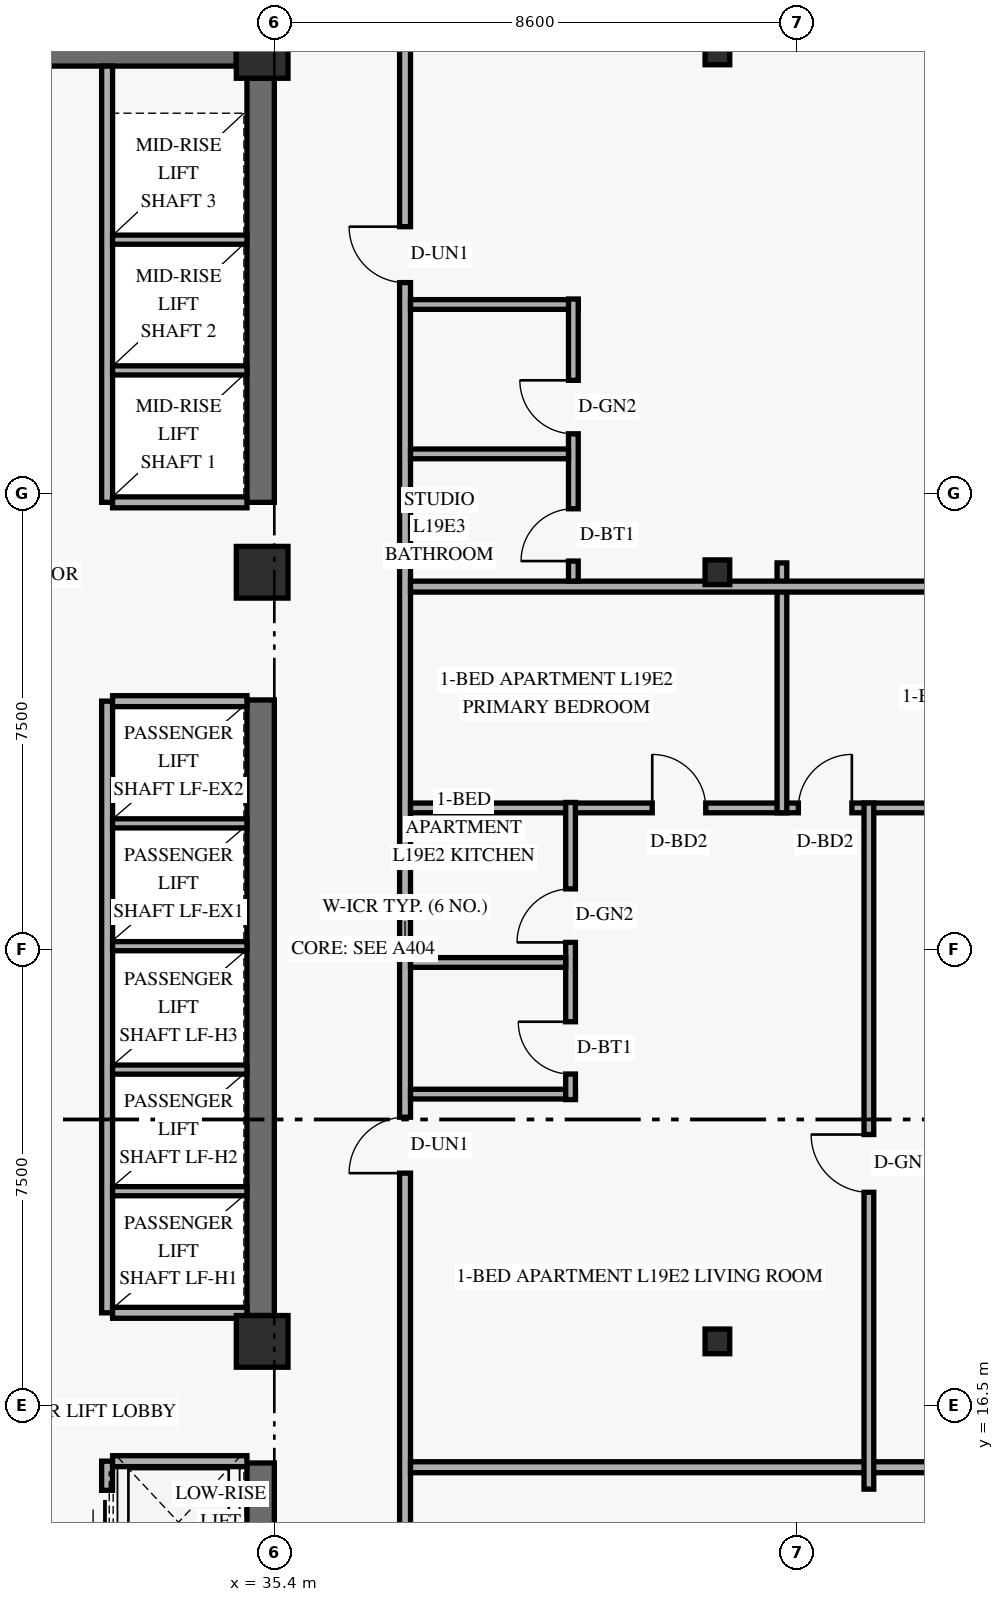
"""IFC4 building model, lengths in metres.
Left out: names, types, materials, properties, quantities, classifications, styles, units other than length and angle.
Written with IfcOpenShell. Run it as: python <this file> out.ifc"""

import sys

from ifc_helpers import new_model, si_unit, direction, frame, frame_2d, origin, origin_2d, place, context, subcontext, project, spatial, rectangle, hollow_rectangle, extrude, element, fill, save


model = new_model("IFC4")
c1 = context("Model", 3, precision=1e-05, world=origin(), true_north=direction((0.0, 1.0)))
c2 = subcontext(c1, "Body", "Model", "MODEL_VIEW")
j1 = project(units=[si_unit("LENGTHUNIT", "METRE"), si_unit("PLANEANGLEUNIT", "RADIAN")], contexts=[c1])
p1 = place(None, origin())
s1 = spatial("IfcSite", under=j1, at=p1, CompositionType="ELEMENT")
p2 = place(p1, origin())
s2 = spatial("IfcBuilding", under=s1, at=p2, CompositionType="ELEMENT")
p3 = place(p2, frame((0.0, 0.0, 76.8)))
s3 = spatial("IfcBuildingStorey", under=s2, at=p3, CompositionType="ELEMENT", Elevation=76.8)
p4 = place(p3, frame((35.175, 9.675, 0.0), z_axis=(0.0, 0.0, 1.0), x_axis=(0.0, 1.0, 0.0)))
e1 = element("IfcWall", 1, at=p4, inside=s3, PredefinedType="SHEAR", context=c2, shape_type="SweptSolid", body=[
    extrude(rectangle(XDim=5.875, YDim=0.45, at=frame_2d((2.938, 0.0))), origin(), (0.0, 0.0, 1.0), 2.749),
])
p5 = place(p3, frame((35.175, 17.975, 0.0), z_axis=(0.0, 0.0, 1.0), x_axis=(0.0, 1.0, 0.0)))
e2 = element("IfcWall", 2, at=p5, inside=s3, PredefinedType="SHEAR", context=c2, shape_type="SweptSolid", body=[
    extrude(rectangle(XDim=10.125, YDim=0.45, at=frame_2d((5.062, 0.0))), origin(), (0.0, 0.0, 1.0), 2.749),
])
p6 = place(p3, frame((35.175, 31.35, 0.0), z_axis=(0.0, 0.0, 1.0), x_axis=(0.0, 1.0, 0.0)))
e3 = element("IfcWall", 3, at=p6, inside=s3, PredefinedType="SHEAR", context=c2, shape_type="SweptSolid", body=[
    extrude(rectangle(XDim=6.975, YDim=0.45, at=frame_2d((3.487, 0.0))), origin(), (0.0, 0.0, 1.0), 2.749),
])
p7 = place(p3, frame((24.625, 38.75, 0.0), z_axis=(0.0, 0.0, 1.0), x_axis=(1.0, 0.0, 0.0)))
e4 = element("IfcWall", 4, at=p7, inside=s3, PredefinedType="SHEAR", context=c2, shape_type="SweptSolid", body=[
    extrude(rectangle(XDim=10.15, YDim=0.45, at=frame_2d((5.075, 0.0))), origin(), (0.0, 0.0, 1.0), 3.36),
])
for number, where, z_axis, x_axis in (
    (5, (35.2, 17.55, 0.0), (0.0, 0.0, 1.0), (1.0, 0.0, 0.0)),
    (6, (35.2, 30.2, 0.0), (0.0, 0.0, 1.0), (1.0, 0.0, 0.0)),
    (7, (35.2, 38.75, 0.0), (0.0, 0.0, 1.0), (1.0, 0.0, 0.0)),
):
    element("IfcColumn", number, at=place(p3, frame(where, z_axis=z_axis, x_axis=x_axis)), inside=s3, PredefinedType="COLUMN", context=c2, shape_type="SweptSolid", body=[
        extrude(rectangle(XDim=0.85, YDim=0.85, at=origin_2d()), origin(), (0.0, 0.0, 1.0), 3.6),
    ])
for number, where, z_axis, x_axis in (
    (8, (42.624, 17.55, 0.0), (0.035, 0.0, 0.999), (0.0, 1.0, 0.0)),
    (9, (42.624, 30.2, 0.0), (0.035, 0.0, 0.999), (0.0, 1.0, 0.0)),
    (10, (42.624, 38.75, 0.0), (0.035, 0.0, 0.999), (0.0, 1.0, 0.0)),
):
    element("IfcColumn", number, at=place(p3, frame(where, z_axis=z_axis, x_axis=x_axis)), inside=s3, PredefinedType="COLUMN", context=c2, shape_type="SweptSolid", body=[
        extrude(hollow_rectangle(XDim=0.406, YDim=0.406, WallThickness=0.016, at=origin_2d()), origin(), (0.0, 0.0, 1.0), 3.602),
    ])
p8 = place(p3, frame((32.65, 9.5, 0.0), z_axis=(0.0, 0.0, 1.0), x_axis=(0.0, 1.0, 0.0)))
e11 = element("IfcWall", 11, at=p8, inside=s3, PredefinedType="STANDARD", context=c2, shape_type="SweptSolid", body=[
    extrude(rectangle(XDim=6.08, YDim=0.18, at=frame_2d((3.04, 0.0))), origin(), (0.0, 0.0, 1.0), 3.36),
])
p9 = place(p8, frame((0.55, 0.0, 0.0)))
e12 = element("IfcOpeningElement", 12, at=p9, cuts=e11, PredefinedType="OPENING", context=c2, shape_type="SweptSolid", body=[
    extrude(rectangle(XDim=1.05, YDim=2.2, at=frame_2d((0.525, 1.1))), frame((0.0, 0.1, 0.0), z_axis=(0.0, -1.0, 0.0), x_axis=(1.0, 0.0, 0.0)), (0.0, 0.0, 1.0), 0.2),
])
p10 = place(p8, frame((2.55, 0.0, 0.0)))
e13 = element("IfcOpeningElement", 13, at=p10, cuts=e11, PredefinedType="OPENING", context=c2, shape_type="SweptSolid", body=[
    extrude(rectangle(XDim=1.05, YDim=2.2, at=frame_2d((0.525, 1.1))), frame((0.0, 0.1, 0.0), z_axis=(0.0, -1.0, 0.0), x_axis=(1.0, 0.0, 0.0)), (0.0, 0.0, 1.0), 0.2),
])
p11 = place(p8, frame((4.55, 0.0, 0.0)))
e14 = element("IfcOpeningElement", 14, at=p11, cuts=e11, PredefinedType="OPENING", context=c2, shape_type="SweptSolid", body=[
    extrude(rectangle(XDim=1.05, YDim=2.2, at=frame_2d((0.525, 1.1))), frame((0.0, 0.1, 0.0), z_axis=(0.0, -1.0, 0.0), x_axis=(1.0, 0.0, 0.0)), (0.0, 0.0, 1.0), 0.2),
])
p12 = place(p3, frame((32.74, 15.58, 0.0), z_axis=(0.0, 0.0, 1.0), x_axis=(1.0, 0.0, 0.0)))
e15 = element("IfcWall", 15, at=p12, inside=s3, PredefinedType="STANDARD", context=c2, shape_type="SweptSolid", body=[
    extrude(rectangle(XDim=2.21, YDim=0.18, at=frame_2d((1.105, 0.0))), origin(), (0.0, 0.0, 1.0), 3.36),
])
p13 = place(p3, frame((32.65, 18.02, 0.0), z_axis=(0.0, 0.0, 1.0), x_axis=(0.0, 1.0, 0.0)))
e16 = element("IfcWall", 16, at=p13, inside=s3, PredefinedType="STANDARD", context=c2, shape_type="SweptSolid", body=[
    extrude(rectangle(XDim=10.06, YDim=0.18, at=frame_2d((5.03, 0.0))), origin(), (0.0, 0.0, 1.0), 3.36),
])
for number, where, z_axis, x_axis in (
    (17, (32.74, 18.02, 0.0), (0.0, 0.0, 1.0), (1.0, 0.0, 0.0)),
    (18, (32.74, 28.08, 0.0), (0.0, 0.0, 1.0), (1.0, 0.0, 0.0)),
):
    element("IfcWall", number, at=place(p3, frame(where, z_axis=z_axis, x_axis=x_axis)), inside=s3, PredefinedType="STANDARD", context=c2, shape_type="SweptSolid", body=[
        extrude(rectangle(XDim=2.21, YDim=0.18, at=frame_2d((1.105, 0.0))), origin(), (0.0, 0.0, 1.0), 3.36),
    ])
for number, where, z_axis, x_axis in (
    (19, (32.74, 20.02, 0.0), (0.0, 0.0, 1.0), (1.0, 0.0, 0.0)),
    (20, (32.74, 22.02, 0.0), (0.0, 0.0, 1.0), (1.0, 0.0, 0.0)),
    (21, (32.74, 24.05, 0.0), (0.0, 0.0, 1.0), (1.0, 0.0, 0.0)),
    (22, (32.74, 26.07, 0.0), (0.0, 0.0, 1.0), (1.0, 0.0, 0.0)),
):
    element("IfcWall", number, at=place(p3, frame(where, z_axis=z_axis, x_axis=x_axis)), inside=s3, PredefinedType="STANDARD", context=c2, shape_type="SweptSolid", body=[
        extrude(rectangle(XDim=2.21, YDim=0.15, at=frame_2d((1.105, 0.0))), origin(), (0.0, 0.0, 1.0), 3.36),
    ])
p14 = place(p3, frame((32.65, 31.35, 0.0), z_axis=(0.0, 0.0, 1.0), x_axis=(0.0, 1.0, 0.0)))
e23 = element("IfcWall", 23, at=p14, inside=s3, PredefinedType="STANDARD", context=c2, shape_type="SweptSolid", body=[
    extrude(rectangle(XDim=7.175, YDim=0.18, at=frame_2d((3.587, 0.0))), origin(), (0.0, 0.0, 1.0), 3.36),
])
p15 = place(p3, frame((32.74, 31.35, 0.0), z_axis=(0.0, 0.0, 1.0), x_axis=(1.0, 0.0, 0.0)))
e24 = element("IfcWall", 24, at=p15, inside=s3, PredefinedType="STANDARD", context=c2, shape_type="SweptSolid", body=[
    extrude(rectangle(XDim=2.21, YDim=0.18, at=frame_2d((1.105, 0.0))), origin(), (0.0, 0.0, 1.0), 3.36),
])
for number, where, z_axis, x_axis in (
    (25, (32.74, 33.52, 0.0), (0.0, 0.0, 1.0), (1.0, 0.0, 0.0)),
    (26, (32.74, 35.67, 0.0), (0.0, 0.0, 1.0), (1.0, 0.0, 0.0)),
):
    element("IfcWall", number, at=place(p3, frame(where, z_axis=z_axis, x_axis=x_axis)), inside=s3, PredefinedType="STANDARD", context=c2, shape_type="SweptSolid", body=[
        extrude(rectangle(XDim=2.21, YDim=0.15, at=frame_2d((1.105, 0.0))), origin(), (0.0, 0.0, 1.0), 3.36),
    ])
p16 = place(p3, frame((37.55, 2.98, 0.0), z_axis=(0.0, 0.0, 1.0), x_axis=(0.0, 1.0, 0.0)))
e27 = element("IfcWall", 27, at=p16, inside=s3, PredefinedType="STANDARD", context=c2, shape_type="SweptSolid", body=[
    extrude(rectangle(XDim=42.04, YDim=0.18, at=frame_2d((21.02, 0.0))), origin(), (0.0, 0.0, 1.0), 2.731),
])
p17 = place(p16, frame((8.898, 0.0, 0.0)))
e28 = element("IfcOpeningElement", 28, at=p17, cuts=e27, PredefinedType="OPENING", context=c2, shape_type="SweptSolid", body=[
    extrude(rectangle(XDim=0.92, YDim=2.15, at=frame_2d((0.46, 1.075))), frame((0.0, 0.1, 0.0), z_axis=(0.0, -1.0, 0.0), x_axis=(1.0, 0.0, 0.0)), (0.0, 0.0, 1.0), 0.2),
])
p18 = place(p16, frame((17.337, 0.0, 0.0)))
e29 = element("IfcOpeningElement", 29, at=p18, cuts=e27, PredefinedType="OPENING", context=c2, shape_type="SweptSolid", body=[
    extrude(rectangle(XDim=0.92, YDim=2.15, at=frame_2d((0.46, 1.075))), frame((0.0, 0.1, 0.0), z_axis=(0.0, -1.0, 0.0), x_axis=(1.0, 0.0, 0.0)), (0.0, 0.0, 1.0), 0.2),
])
p19 = place(p16, frame((31.984, 0.0, 0.0)))
e30 = element("IfcOpeningElement", 30, at=p19, cuts=e27, PredefinedType="OPENING", context=c2, shape_type="SweptSolid", body=[
    extrude(rectangle(XDim=0.92, YDim=2.15, at=frame_2d((0.46, 1.075))), frame((0.0, 0.1, 0.0), z_axis=(0.0, -1.0, 0.0), x_axis=(1.0, 0.0, 0.0)), (0.0, 0.0, 1.0), 0.2),
])
p20 = place(p3, frame((35.42, 38.75, 0.0), z_axis=(0.0, 0.0, 1.0), x_axis=(0.0, 1.0, 0.0)))
e31 = element("IfcWall", 31, at=p20, inside=s3, PredefinedType="STANDARD", context=c2, shape_type="SweptSolid", body=[
    extrude(rectangle(XDim=0.51, YDim=0.18, at=frame_2d((0.255, 0.0))), origin(), (0.0, 0.0, 1.0), 2.731),
])
p21 = place(p3, frame((37.64, 15.48, 0.0), z_axis=(0.0, 0.0, 1.0), x_axis=(1.0, 0.0, 0.0)))
e32 = element("IfcWall", 32, at=p21, inside=s3, PredefinedType="PARTITIONING", context=c2, shape_type="SweptSolid", body=[
    extrude(rectangle(XDim=15.68, YDim=0.18, at=frame_2d((7.84, 0.0))), origin(), (0.0, 0.0, 1.0), 2.731),
])
p22 = place(p3, frame((37.64, 26.324, 0.0), z_axis=(0.0, 0.0, 1.0), x_axis=(1.0, 0.0, 0.0)))
e33 = element("IfcWall", 33, at=p22, inside=s3, PredefinedType="PARTITIONING", context=c2, shape_type="SweptSolid", body=[
    extrude(rectangle(XDim=15.68, YDim=0.16, at=frame_2d((7.84, 0.0))), origin(), (0.0, 0.0, 1.0), 2.731),
])
p23 = place(p22, frame((3.975, 0.0, 0.0)))
e34 = element("IfcOpeningElement", 34, at=p23, cuts=e33, PredefinedType="OPENING", context=c2, shape_type="SweptSolid", body=[
    extrude(rectangle(XDim=0.88, YDim=2.14, at=frame_2d((0.44, 1.07))), frame((0.0, 0.09, 0.0), z_axis=(0.0, -1.0, 0.0), x_axis=(1.0, 0.0, 0.0)), (0.0, 0.0, 1.0), 0.18),
])
p24 = place(p22, frame((6.378, 0.0, 0.0)))
e35 = element("IfcOpeningElement", 35, at=p24, cuts=e33, PredefinedType="OPENING", context=c2, shape_type="SweptSolid", body=[
    extrude(rectangle(XDim=0.88, YDim=2.14, at=frame_2d((0.44, 1.07))), frame((0.0, 0.09, 0.0), z_axis=(0.0, -1.0, 0.0), x_axis=(1.0, 0.0, 0.0)), (0.0, 0.0, 1.0), 0.18),
])
p25 = place(p3, frame((37.64, 21.617, 0.0), z_axis=(0.0, 0.0, 1.0), x_axis=(1.0, 0.0, 0.0)))
e36 = element("IfcWall", 36, at=p25, inside=s3, PredefinedType="PLUMBINGWALL", context=c2, shape_type="SweptSolid", body=[
    extrude(rectangle(XDim=2.712, YDim=0.16, at=frame_2d((1.356, 0.0))), origin(), (0.0, 0.0, 1.0), 3.36),
])
p26 = place(p3, frame((40.272, 21.527, 0.0), z_axis=(0.0, 0.0, 1.0), x_axis=(0.0, 1.0, 0.0)))
e37 = element("IfcWall", 37, at=p26, inside=s3, PredefinedType="PLUMBINGWALL", context=c2, shape_type="SweptSolid", body=[
    extrude(rectangle(XDim=4.887, YDim=0.16, at=frame_2d((2.443, 0.0))), origin(), (0.0, 0.0, 1.0), 3.36),
])
p27 = place(p26, frame((0.42, 0.0, 0.0)))
e38 = element("IfcOpeningElement", 38, at=p27, cuts=e37, PredefinedType="OPENING", context=c2, shape_type="SweptSolid", body=[
    extrude(rectangle(XDim=0.86, YDim=2.12, at=frame_2d((0.43, 1.06))), frame((0.0, 0.09, 0.0), z_axis=(0.0, -1.0, 0.0), x_axis=(1.0, 0.0, 0.0)), (0.0, 0.0, 1.0), 0.18),
])
p28 = place(p26, frame((2.585, 0.0, 0.0)))
e39 = element("IfcOpeningElement", 39, at=p28, cuts=e37, PredefinedType="OPENING", context=c2, shape_type="SweptSolid", body=[
    extrude(rectangle(XDim=0.88, YDim=2.12, at=frame_2d((0.44, 1.06))), frame((0.0, 0.09, 0.0), z_axis=(0.0, -1.0, 0.0), x_axis=(1.0, 0.0, 0.0)), (0.0, 0.0, 1.0), 0.18),
])
p29 = place(p3, frame((37.64, 23.782, 0.0), z_axis=(0.0, 0.0, 1.0), x_axis=(1.0, 0.0, 0.0)))
e40 = element("IfcWall", 40, at=p29, inside=s3, PredefinedType="PLUMBINGWALL", context=c2, shape_type="SweptSolid", body=[
    extrude(rectangle(XDim=2.552, YDim=0.16, at=frame_2d((1.276, 0.0))), origin(), (0.0, 0.0, 1.0), 3.36),
])
p30 = place(p3, frame((45.178, 15.12, 0.0), z_axis=(0.0, 0.0, 1.0), x_axis=(0.0, 1.0, 0.0)))
e41 = element("IfcWall", 41, at=p30, inside=s3, PredefinedType="PARTITIONING", context=c2, shape_type="SweptSolid", body=[
    extrude(rectangle(XDim=11.284, YDim=0.16, at=frame_2d((5.642, 0.0))), origin(), (0.0, 0.0, 1.0), 2.731),
])
p31 = place(p30, frame((4.882, 0.0, 0.0)))
e42 = element("IfcOpeningElement", 42, at=p31, cuts=e41, PredefinedType="OPENING", context=c2, shape_type="SweptSolid", body=[
    extrude(rectangle(XDim=0.95, YDim=2.15, at=frame_2d((0.475, 1.075))), frame((0.0, 0.09, 0.0), z_axis=(0.0, -1.0, 0.0), x_axis=(1.0, 0.0, 0.0)), (0.0, 0.0, 1.0), 0.18),
])
p32 = place(p3, frame((43.748, 26.244, 0.0), z_axis=(0.0, 0.0, 1.0), x_axis=(0.0, 1.0, 0.0)))
e43 = element("IfcWall", 43, at=p32, inside=s3, PredefinedType="PARTITIONING", context=c2, shape_type="SweptSolid", body=[
    extrude(rectangle(XDim=4.11, YDim=0.16, at=frame_2d((2.055, 0.0))), origin(), (0.0, 0.0, 1.0), 2.731),
])
p33 = place(p3, frame((37.64, 29.964, 0.0), z_axis=(0.0, 0.0, 1.0), x_axis=(1.0, 0.0, 0.0)))
e44 = element("IfcWall", 44, at=p33, inside=s3, PredefinedType="PARTITIONING", context=c2, shape_type="SweptSolid", body=[
    extrude(rectangle(XDim=15.68, YDim=0.18, at=frame_2d((7.84, 0.0))), origin(), (0.0, 0.0, 1.0), 2.731),
])
p34 = place(p3, frame((37.64, 34.604, 0.0), z_axis=(0.0, 0.0, 1.0), x_axis=(1.0, 0.0, 0.0)))
e45 = element("IfcWall", 45, at=p34, inside=s3, PredefinedType="PLUMBINGWALL", context=c2, shape_type="SweptSolid", body=[
    extrude(rectangle(XDim=2.758, YDim=0.16, at=frame_2d((1.379, 0.0))), origin(), (0.0, 0.0, 1.0), 2.988),
])
p35 = place(p3, frame((40.318, 30.054, 0.0), z_axis=(0.0, 0.0, 1.0), x_axis=(0.0, 1.0, 0.0)))
e46 = element("IfcWall", 46, at=p35, inside=s3, PredefinedType="PLUMBINGWALL", context=c2, shape_type="SweptSolid", body=[
    extrude(rectangle(XDim=4.64, YDim=0.16, at=frame_2d((2.32, 0.0))), origin(), (0.0, 0.0, 1.0), 2.731),
])
p36 = place(p35, frame((0.33, 0.0, 0.0)))
e47 = element("IfcOpeningElement", 47, at=p36, cuts=e46, PredefinedType="OPENING", context=c2, shape_type="SweptSolid", body=[
    extrude(rectangle(XDim=0.86, YDim=2.12, at=frame_2d((0.43, 1.06))), frame((0.0, 0.09, 0.0), z_axis=(0.0, -1.0, 0.0), x_axis=(1.0, 0.0, 0.0)), (0.0, 0.0, 1.0), 0.18),
])
p37 = place(p35, frame((2.423, 0.0, 0.0)))
e48 = element("IfcOpeningElement", 48, at=p37, cuts=e46, PredefinedType="OPENING", context=c2, shape_type="SweptSolid", body=[
    extrude(rectangle(XDim=0.88, YDim=2.12, at=frame_2d((0.44, 1.06))), frame((0.0, 0.09, 0.0), z_axis=(0.0, -1.0, 0.0), x_axis=(1.0, 0.0, 0.0)), (0.0, 0.0, 1.0), 0.18),
])
p38 = place(p3, frame((37.64, 32.147, 0.0), z_axis=(0.0, 0.0, 1.0), x_axis=(1.0, 0.0, 0.0)))
e49 = element("IfcWall", 49, at=p38, inside=s3, PredefinedType="PLUMBINGWALL", context=c2, shape_type="SweptSolid", body=[
    extrude(rectangle(XDim=2.598, YDim=0.16, at=frame_2d((1.299, 0.0))), origin(), (0.0, 0.0, 1.0), 3.36),
])
p39 = place(p11, origin())
e50 = element("IfcDoor", 50, at=p39, inside=s3, OperationType="SLIDING_TO_LEFT", PredefinedType="DOOR", context=c2, shape_type="SweptSolid", body=[
    extrude(rectangle(XDim=1.05, YDim=2.2, at=frame_2d((0.525, 1.1))), frame((0.0, 0.025, 0.0), z_axis=(0.0, -1.0, 0.0), x_axis=(1.0, 0.0, 0.0)), (0.0, 0.0, 1.0), 0.05),
])
fill(e14, e50)
p40 = place(p31, origin())
e51 = element("IfcDoor", 51, at=p40, inside=s3, OperationType="SINGLE_SWING_RIGHT", PredefinedType="DOOR", context=c2, shape_type="SweptSolid", body=[
    extrude(rectangle(XDim=0.95, YDim=2.15, at=frame_2d((0.475, 1.075))), frame((0.0, 0.025, 0.0), z_axis=(0.0, -1.0, 0.0), x_axis=(1.0, 0.0, 0.0)), (0.0, 0.0, 1.0), 0.05),
])
fill(e42, e51)
p41 = place(p18, origin())
e52 = element("IfcDoor", 52, at=p41, inside=s3, OperationType="SINGLE_SWING_LEFT", PredefinedType="DOOR", context=c2, shape_type="SweptSolid", body=[
    extrude(rectangle(XDim=0.92, YDim=2.15, at=frame_2d((0.46, 1.075))), frame((0.0, 0.025, 0.0), z_axis=(0.0, -1.0, 0.0), x_axis=(1.0, 0.0, 0.0)), (0.0, 0.0, 1.0), 0.05),
])
fill(e29, e52)
p42 = place(p27, origin())
e53 = element("IfcDoor", 53, at=p42, inside=s3, OperationType="SINGLE_SWING_RIGHT", PredefinedType="DOOR", context=c2, shape_type="SweptSolid", body=[
    extrude(rectangle(XDim=0.86, YDim=2.12, at=frame_2d((0.43, 1.06))), frame((0.0, 0.025, 0.0), z_axis=(0.0, -1.0, 0.0), x_axis=(1.0, 0.0, 0.0)), (0.0, 0.0, 1.0), 0.05),
])
fill(e38, e53)
p43 = place(p28, origin())
e54 = element("IfcDoor", 54, at=p43, inside=s3, OperationType="SINGLE_SWING_LEFT", PredefinedType="DOOR", context=c2, shape_type="SweptSolid", body=[
    extrude(rectangle(XDim=0.88, YDim=2.12, at=frame_2d((0.44, 1.06))), frame((0.0, 0.025, 0.0), z_axis=(0.0, -1.0, 0.0), x_axis=(1.0, 0.0, 0.0)), (0.0, 0.0, 1.0), 0.05),
])
fill(e39, e54)
p44 = place(p23, origin())
e55 = element("IfcDoor", 55, at=p44, inside=s3, OperationType="SINGLE_SWING_LEFT", PredefinedType="DOOR", context=c2, shape_type="SweptSolid", body=[
    extrude(rectangle(XDim=0.88, YDim=2.14, at=frame_2d((0.44, 1.07))), frame((0.0, 0.025, 0.0), z_axis=(0.0, -1.0, 0.0), x_axis=(1.0, 0.0, 0.0)), (0.0, 0.0, 1.0), 0.05),
])
fill(e34, e55)
p45 = place(p24, origin())
e56 = element("IfcDoor", 56, at=p45, inside=s3, OperationType="SINGLE_SWING_RIGHT", PredefinedType="DOOR", context=c2, shape_type="SweptSolid", body=[
    extrude(rectangle(XDim=0.88, YDim=2.14, at=frame_2d((0.44, 1.07))), frame((0.0, 0.025, 0.0), z_axis=(0.0, -1.0, 0.0), x_axis=(1.0, 0.0, 0.0)), (0.0, 0.0, 1.0), 0.05),
])
fill(e35, e56)
p46 = place(p19, origin())
e57 = element("IfcDoor", 57, at=p46, inside=s3, OperationType="SINGLE_SWING_RIGHT", PredefinedType="DOOR", context=c2, shape_type="SweptSolid", body=[
    extrude(rectangle(XDim=0.92, YDim=2.15, at=frame_2d((0.46, 1.075))), frame((0.0, 0.025, 0.0), z_axis=(0.0, -1.0, 0.0), x_axis=(1.0, 0.0, 0.0)), (0.0, 0.0, 1.0), 0.05),
])
fill(e30, e57)
p47 = place(p36, origin())
e58 = element("IfcDoor", 58, at=p47, inside=s3, OperationType="SINGLE_SWING_LEFT", PredefinedType="DOOR", context=c2, shape_type="SweptSolid", body=[
    extrude(rectangle(XDim=0.86, YDim=2.12, at=frame_2d((0.43, 1.06))), frame((0.0, 0.025, 0.0), z_axis=(0.0, -1.0, 0.0), x_axis=(1.0, 0.0, 0.0)), (0.0, 0.0, 1.0), 0.05),
])
fill(e47, e58)
p48 = place(p37, origin())
e59 = element("IfcDoor", 59, at=p48, inside=s3, OperationType="SINGLE_SWING_RIGHT", PredefinedType="DOOR", context=c2, shape_type="SweptSolid", body=[
    extrude(rectangle(XDim=0.88, YDim=2.12, at=frame_2d((0.44, 1.06))), frame((0.0, 0.025, 0.0), z_axis=(0.0, -1.0, 0.0), x_axis=(1.0, 0.0, 0.0)), (0.0, 0.0, 1.0), 0.05),
])
fill(e48, e59)
save(model, sys.argv[1])
